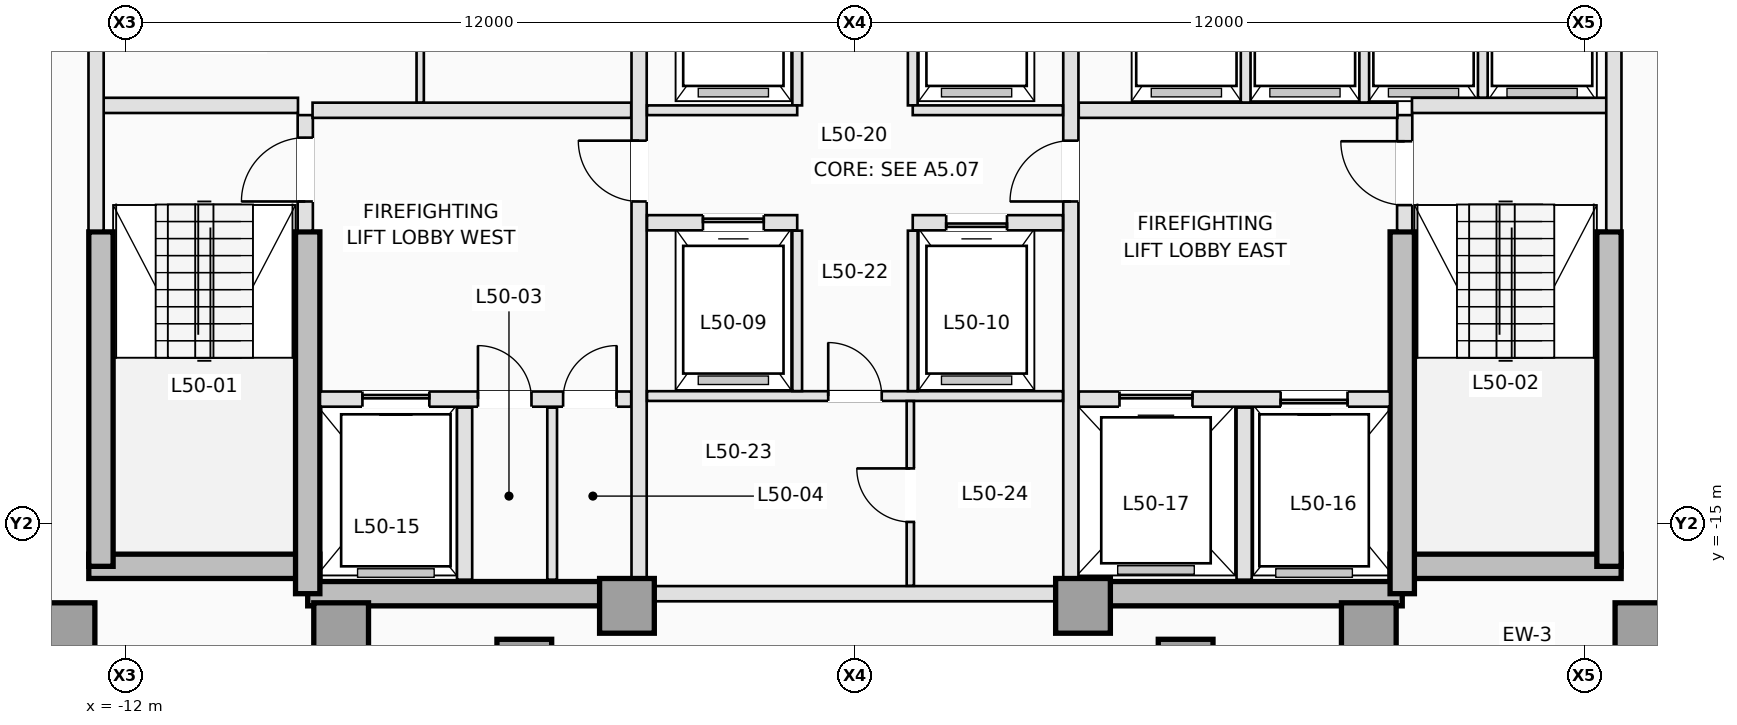
"""IFC4 building model, lengths in metres.
Left out: names, types, materials, properties, quantities, classifications, styles, units other than length and angle.
Written with IfcOpenShell. Run it as: python <this file> out.ifc"""

import sys

from ifc_helpers import new_model, si_unit, direction, frame, frame_2d, origin, origin_2d, place, context, subcontext, project, spatial, rectangle, extrude, element, fill, save


model = new_model("IFC4")
c1 = context("Model", 3, precision=1e-05, world=origin(), true_north=direction((0.0, 1.0)))
c2 = subcontext(c1, "Body", "Model", "MODEL_VIEW")
j1 = project(units=[si_unit("LENGTHUNIT", "METRE"), si_unit("PLANEANGLEUNIT", "RADIAN")], contexts=[c1])
p1 = place(None, origin())
s1 = spatial("IfcSite", under=j1, at=p1, CompositionType="ELEMENT")
p2 = place(p1, origin())
s2 = spatial("IfcBuilding", under=s1, at=p2, CompositionType="ELEMENT")
p3 = place(p2, frame((0.0, 0.0, 183.4)))
s3 = spatial("IfcBuildingStorey", under=s2, at=p3, CompositionType="ELEMENT", Elevation=183.4)
p4 = place(p3, frame((-12.6, -15.7, 0.0), z_axis=(0.0, 0.0, 1.0), x_axis=(1.0, 0.0, 0.0)))
e1 = element("IfcWall", 1, at=p4, inside=s3, PredefinedType="SHEAR", context=c2, shape_type="SweptSolid", body=[
    extrude(rectangle(XDim=3.8, YDim=0.4, at=frame_2d((1.9, 0.0))), origin(), (0.0, 0.0, 1.0), 3.5),
])
for number, where, z_axis, x_axis in (
    (2, (-9.0, -16.15, 0.0), (0.0, 0.0, 1.0), (1.0, 0.0, 0.0)),
    (3, (3.75, -16.15, 0.0), (0.0, 0.0, 1.0), (1.0, 0.0, 0.0)),
):
    element("IfcWall", number, at=place(p3, frame(where, z_axis=z_axis, x_axis=x_axis)), inside=s3, PredefinedType="SHEAR", context=c2, shape_type="SweptSolid", body=[
        extrude(rectangle(XDim=5.25, YDim=0.4, at=frame_2d((2.625, 0.0))), origin(), (0.0, 0.0, 1.0), 3.5),
    ])
p5 = place(p3, frame((8.8, -15.7, 0.0), z_axis=(0.0, 0.0, 1.0), x_axis=(1.0, 0.0, 0.0)))
e4 = element("IfcWall", 4, at=p5, inside=s3, PredefinedType="SHEAR", context=c2, shape_type="SweptSolid", body=[
    extrude(rectangle(XDim=3.8, YDim=0.4, at=frame_2d((1.9, 0.0))), origin(), (0.0, 0.0, 1.0), 3.5),
])
for number, where, z_axis, x_axis in (
    (5, (-12.4, -15.7, 0.0), (0.0, 0.0, 1.0), (0.0, 1.0, 0.0)),
    (6, (12.4, -15.7, 0.0), (0.0, 0.0, 1.0), (0.0, 1.0, 0.0)),
):
    element("IfcWall", number, at=place(p3, frame(where, z_axis=z_axis, x_axis=x_axis)), inside=s3, PredefinedType="SHEAR", context=c2, shape_type="SweptSolid", body=[
        extrude(rectangle(XDim=5.5, YDim=0.4, at=frame_2d((2.75, 0.0))), origin(), (0.0, 0.0, 1.0), 3.5),
    ])
for number, where, z_axis, x_axis in (
    (7, (-9.0, -16.15, 0.0), (0.0, 0.0, 1.0), (0.0, 1.0, 0.0)),
    (8, (9.0, -16.15, 0.0), (0.0, 0.0, 1.0), (0.0, 1.0, 0.0)),
):
    element("IfcWall", number, at=place(p3, frame(where, z_axis=z_axis, x_axis=x_axis)), inside=s3, PredefinedType="SHEAR", context=c2, shape_type="SweptSolid", body=[
        extrude(rectangle(XDim=5.95, YDim=0.4, at=frame_2d((2.975, 0.0))), origin(), (0.0, 0.0, 1.0), 3.5),
    ])
for number, where, z_axis, x_axis in (
    (9, (-12.95, -16.75, 0.0), (0.0, 0.0, 1.0), (1.0, 0.0, 0.0)),
    (10, (-8.45, -16.75, 0.0), (0.0, 0.0, 1.0), (1.0, 0.0, 0.0)),
    (11, (-3.75, -16.35, 0.0), (0.0, 0.0, 1.0), (1.0, 0.0, 0.0)),
    (12, (3.75, -16.35, 0.0), (0.0, 0.0, 1.0), (1.0, 0.0, 0.0)),
    (13, (8.45, -16.75, 0.0), (0.0, 0.0, 1.0), (1.0, 0.0, 0.0)),
    (14, (12.95, -16.75, 0.0), (0.0, 0.0, 1.0), (1.0, 0.0, 0.0)),
    (15, (-5.438, -17.35, 0.0), (0.0, 0.0, 1.0), (0.0, 1.0, 0.0)),
    (16, (5.438, -17.35, 0.0), (0.0, 0.0, 1.0), (0.0, 1.0, 0.0)),
):
    element("IfcColumn", number, at=place(p3, frame(where, z_axis=z_axis, x_axis=x_axis)), inside=s3, PredefinedType="COLUMN", context=c2, shape_type="SweptSolid", body=[
        extrude(rectangle(XDim=0.9, YDim=0.9, at=origin_2d()), origin(), (0.0, 0.0, 1.0), 3.5),
    ])
p6 = place(p3, frame((-9.04, -10.18, 0.0), z_axis=(0.0, 0.0, 1.0), x_axis=(0.0, 1.0, 0.0)))
e17 = element("IfcWall", 17, at=p6, inside=s3, PredefinedType="PARTITIONING", context=c2, shape_type="SweptSolid", body=[
    extrude(rectangle(XDim=1.9, YDim=0.25, at=frame_2d((0.95, 0.0))), origin(), (0.0, 0.0, 1.0), 3.25),
])
p7 = place(p6, frame((0.48, 0.0, 0.0)))
e18 = element("IfcOpeningElement", 18, at=p7, cuts=e17, PredefinedType="OPENING", context=c2, shape_type="SweptSolid", body=[
    extrude(rectangle(XDim=1.05, YDim=2.15, at=frame_2d((0.525, 1.075))), frame((0.0, 0.135, 0.0), z_axis=(0.0, -1.0, 0.0), x_axis=(1.0, 0.0, 0.0)), (0.0, 0.0, 1.0), 0.27),
])
p8 = place(p3, frame((9.04, -10.18, 0.0), z_axis=(0.0, 0.0, 1.0), x_axis=(0.0, 1.0, 0.0)))
e19 = element("IfcWall", 19, at=p8, inside=s3, PredefinedType="PARTITIONING", context=c2, shape_type="SweptSolid", body=[
    extrude(rectangle(XDim=1.9, YDim=0.25, at=frame_2d((0.95, 0.0))), origin(), (0.0, 0.0, 1.0), 3.25),
])
p9 = place(p8, frame((0.42, 0.0, 0.0)))
e20 = element("IfcOpeningElement", 20, at=p9, cuts=e19, PredefinedType="OPENING", context=c2, shape_type="SweptSolid", body=[
    extrude(rectangle(XDim=1.05, YDim=2.15, at=frame_2d((0.525, 1.075))), frame((0.0, 0.135, 0.0), z_axis=(0.0, -1.0, 0.0), x_axis=(1.0, 0.0, 0.0)), (0.0, 0.0, 1.0), 0.27),
])
for number, where, z_axis, x_axis in (
    (21, (-12.38, -8.12, 0.0), (0.0, 0.0, 1.0), (1.0, 0.0, 0.0)),
    (22, (9.16, -8.12, 0.0), (0.0, 0.0, 1.0), (1.0, 0.0, 0.0)),
):
    element("IfcWall", number, at=place(p3, frame(where, z_axis=z_axis, x_axis=x_axis)), inside=s3, PredefinedType="PARTITIONING", context=c2, shape_type="SweptSolid", body=[
        extrude(rectangle(XDim=3.22, YDim=0.25, at=frame_2d((1.61, 0.0))), origin(), (0.0, 0.0, 1.0), 3.25),
    ])
for number, where, z_axis, x_axis in (
    (23, (-12.48, -10.18, 0.0), (0.0, 0.0, 1.0), (0.0, 1.0, 0.0)),
    (24, (12.48, -10.18, 0.0), (0.0, 0.0, 1.0), (0.0, 1.0, 0.0)),
):
    element("IfcWall", number, at=place(p3, frame(where, z_axis=z_axis, x_axis=x_axis)), inside=s3, PredefinedType="PARTITIONING", context=c2, shape_type="SweptSolid", body=[
        extrude(rectangle(XDim=4.84, YDim=0.25, at=frame_2d((2.42, 0.0))), origin(), (0.0, 0.0, 1.0), 3.25),
    ])
p10 = place(p3, frame((-8.798, -12.95, 0.0), z_axis=(0.0, 0.0, 1.0), x_axis=(1.0, 0.0, 0.0)))
e25 = element("IfcWall", 25, at=p10, inside=s3, PredefinedType="PARTITIONING", context=c2, shape_type="SweptSolid", body=[
    extrude(rectangle(XDim=5.118, YDim=0.25, at=frame_2d((2.559, 0.0))), origin(), (0.0, 0.0, 1.0), 3.25),
])
p11 = place(p10, frame((0.698, 0.0, 0.0)))
e26 = element("IfcOpeningElement", 26, at=p11, cuts=e25, PredefinedType="OPENING", context=c2, shape_type="SweptSolid", body=[
    extrude(rectangle(XDim=1.1, YDim=2.15, at=frame_2d((0.55, 1.075))), frame((0.0, 0.135, 0.0), z_axis=(0.0, -1.0, 0.0), x_axis=(1.0, 0.0, 0.0)), (0.0, 0.0, 1.0), 0.27),
])
p12 = place(p10, frame((2.598, 0.0, 0.0)))
e27 = element("IfcOpeningElement", 27, at=p12, cuts=e25, PredefinedType="OPENING", context=c2, shape_type="SweptSolid", body=[
    extrude(rectangle(XDim=0.88, YDim=2.1, at=frame_2d((0.44, 1.05))), frame((0.0, 0.135, 0.0), z_axis=(0.0, -1.0, 0.0), x_axis=(1.0, 0.0, 0.0)), (0.0, 0.0, 1.0), 0.27),
])
p13 = place(p10, frame((3.998, 0.0, 0.0)))
e28 = element("IfcOpeningElement", 28, at=p13, cuts=e25, PredefinedType="OPENING", context=c2, shape_type="SweptSolid", body=[
    extrude(rectangle(XDim=0.88, YDim=2.1, at=frame_2d((0.44, 1.05))), frame((0.0, 0.135, 0.0), z_axis=(0.0, -1.0, 0.0), x_axis=(1.0, 0.0, 0.0)), (0.0, 0.0, 1.0), 0.27),
])
p14 = place(p3, frame((3.68, -12.95, 0.0), z_axis=(0.0, 0.0, 1.0), x_axis=(1.0, 0.0, 0.0)))
e29 = element("IfcWall", 29, at=p14, inside=s3, PredefinedType="PARTITIONING", context=c2, shape_type="SweptSolid", body=[
    extrude(rectangle(XDim=5.118, YDim=0.25, at=frame_2d((2.559, 0.0))), origin(), (0.0, 0.0, 1.0), 3.25),
])
p15 = place(p14, frame((3.32, 0.0, 0.0)))
e30 = element("IfcOpeningElement", 30, at=p15, cuts=e29, PredefinedType="OPENING", context=c2, shape_type="SweptSolid", body=[
    extrude(rectangle(XDim=1.1, YDim=2.15, at=frame_2d((0.55, 1.075))), frame((0.0, 0.135, 0.0), z_axis=(0.0, -1.0, 0.0), x_axis=(1.0, 0.0, 0.0)), (0.0, 0.0, 1.0), 0.27),
])
p16 = place(p14, frame((0.67, 0.0, 0.0)))
e31 = element("IfcOpeningElement", 31, at=p16, cuts=e29, PredefinedType="OPENING", context=c2, shape_type="SweptSolid", body=[
    extrude(rectangle(XDim=1.2, YDim=2.15, at=frame_2d((0.6, 1.075))), frame((0.0, 0.135, 0.0), z_axis=(0.0, -1.0, 0.0), x_axis=(1.0, 0.0, 0.0)), (0.0, 0.0, 1.0), 0.27),
])
p17 = place(p3, frame((-6.42, -15.92, 0.0), z_axis=(0.0, 0.0, 1.0), x_axis=(0.0, 1.0, 0.0)))
e32 = element("IfcWall", 32, at=p17, inside=s3, PredefinedType="PARTITIONING", context=c2, shape_type="SweptSolid", body=[
    extrude(rectangle(XDim=2.83, YDim=0.25, at=frame_2d((1.415, 0.0))), origin(), (0.0, 0.0, 1.0), 3.25),
])
p18 = place(p3, frame((-4.98, -15.92, 0.0), z_axis=(0.0, 0.0, 1.0), x_axis=(0.0, 1.0, 0.0)))
e33 = element("IfcWall", 33, at=p18, inside=s3, PredefinedType="PARTITIONING", context=c2, shape_type="SweptSolid", body=[
    extrude(rectangle(XDim=2.83, YDim=0.16, at=frame_2d((1.415, 0.0))), origin(), (0.0, 0.0, 1.0), 3.25),
])
p19 = place(p3, frame((6.4, -15.92, 0.0), z_axis=(0.0, 0.0, 1.0), x_axis=(0.0, 1.0, 0.0)))
e34 = element("IfcWall", 34, at=p19, inside=s3, PredefinedType="PARTITIONING", context=c2, shape_type="SweptSolid", body=[
    extrude(rectangle(XDim=2.83, YDim=0.25, at=frame_2d((1.415, 0.0))), origin(), (0.0, 0.0, 1.0), 3.25),
])
for number, where, z_axis, x_axis in (
    (35, (-8.92, -8.2, 0.0), (0.0, 0.0, 1.0), (1.0, 0.0, 0.0)),
    (36, (3.68, -8.2, 0.0), (0.0, 0.0, 1.0), (1.0, 0.0, 0.0)),
):
    element("IfcWall", number, at=place(p3, frame(where, z_axis=z_axis, x_axis=x_axis)), inside=s3, PredefinedType="PARTITIONING", context=c2, shape_type="SweptSolid", body=[
        extrude(rectangle(XDim=5.24, YDim=0.25, at=frame_2d((2.62, 0.0))), origin(), (0.0, 0.0, 1.0), 3.25),
    ])
p20 = place(p3, frame((-3.55, -15.898, 0.0), z_axis=(0.0, 0.0, 1.0), x_axis=(0.0, 1.0, 0.0)))
e37 = element("IfcWall", 37, at=p20, inside=s3, PredefinedType="PARTITIONING", context=c2, shape_type="SweptSolid", body=[
    extrude(rectangle(XDim=10.558, YDim=0.25, at=frame_2d((5.279, 0.0))), origin(), (0.0, 0.0, 1.0), 3.25),
])
p21 = place(p20, frame((6.198, 0.0, 0.0)))
e38 = element("IfcOpeningElement", 38, at=p21, cuts=e37, PredefinedType="OPENING", context=c2, shape_type="SweptSolid", body=[
    extrude(rectangle(XDim=1.0, YDim=2.15, at=frame_2d((0.5, 1.075))), frame((0.0, 0.135, 0.0), z_axis=(0.0, -1.0, 0.0), x_axis=(1.0, 0.0, 0.0)), (0.0, 0.0, 1.0), 0.27),
])
p22 = place(p3, frame((3.55, -15.898, 0.0), z_axis=(0.0, 0.0, 1.0), x_axis=(0.0, 1.0, 0.0)))
e39 = element("IfcWall", 39, at=p22, inside=s3, PredefinedType="PARTITIONING", context=c2, shape_type="SweptSolid", body=[
    extrude(rectangle(XDim=10.558, YDim=0.25, at=frame_2d((5.279, 0.0))), origin(), (0.0, 0.0, 1.0), 3.25),
])
p23 = place(p22, frame((6.198, 0.0, 0.0)))
e40 = element("IfcOpeningElement", 40, at=p23, cuts=e39, PredefinedType="OPENING", context=c2, shape_type="SweptSolid", body=[
    extrude(rectangle(XDim=1.0, YDim=2.15, at=frame_2d((0.5, 1.075))), frame((0.0, 0.135, 0.0), z_axis=(0.0, -1.0, 0.0), x_axis=(1.0, 0.0, 0.0)), (0.0, 0.0, 1.0), 0.27),
])
p24 = place(p3, frame((-7.15, -8.073, 0.0), z_axis=(0.0, 0.0, 1.0), x_axis=(0.0, 1.0, 0.0)))
e41 = element("IfcWall", 41, at=p24, inside=s3, PredefinedType="PARTITIONING", context=c2, shape_type="SweptSolid", body=[
    extrude(rectangle(XDim=2.733, YDim=0.12, at=frame_2d((1.366, 0.0))), origin(), (0.0, 0.0, 1.0), 3.25),
])
for number, where, z_axis, x_axis in (
    (42, (6.425, -8.073, 0.0), (0.0, 0.0, 1.0), (0.0, 1.0, 0.0)),
    (43, (8.375, -8.073, 0.0), (0.0, 0.0, 1.0), (0.0, 1.0, 0.0)),
):
    element("IfcWall", number, at=place(p3, frame(where, z_axis=z_axis, x_axis=x_axis)), inside=s3, PredefinedType="PARTITIONING", context=c2, shape_type="SweptSolid", body=[
        extrude(rectangle(XDim=2.733, YDim=0.16, at=frame_2d((1.366, 0.0))), origin(), (0.0, 0.0, 1.0), 3.25),
    ])
p25 = place(p3, frame((10.325, -7.993, 0.0), z_axis=(0.0, 0.0, 1.0), x_axis=(0.0, 1.0, 0.0)))
e44 = element("IfcWall", 44, at=p25, inside=s3, PredefinedType="PARTITIONING", context=c2, shape_type="SweptSolid", body=[
    extrude(rectangle(XDim=2.653, YDim=0.16, at=frame_2d((1.326, 0.0))), origin(), (0.0, 0.0, 1.0), 3.25),
])
p26 = place(p3, frame((-3.298, -16.15, 0.0), z_axis=(0.0, 0.0, 1.0), x_axis=(1.0, 0.0, 0.0)))
e45 = element("IfcWall", 45, at=p26, inside=s3, PredefinedType="PARTITIONING", context=c2, shape_type="SweptSolid", body=[
    extrude(rectangle(XDim=6.596, YDim=0.25, at=frame_2d((3.298, 0.0))), origin(), (0.0, 0.0, 1.0), 2.45),
])
for number, where, z_axis, x_axis in (
    (46, (-0.95, -8.12, 0.0), (0.0, 0.0, 1.0), (0.0, 1.0, 0.0)),
    (47, (0.95, -8.12, 0.0), (0.0, 0.0, 1.0), (0.0, 1.0, 0.0)),
):
    element("IfcWall", number, at=place(p3, frame(where, z_axis=z_axis, x_axis=x_axis)), inside=s3, PredefinedType="PARTITIONING", context=c2, shape_type="SweptSolid", body=[
        extrude(rectangle(XDim=2.78, YDim=0.16, at=frame_2d((1.39, 0.0))), origin(), (0.0, 0.0, 1.0), 3.25),
    ])
for number, where, z_axis, x_axis in (
    (48, (-3.42, -8.2, 0.0), (0.0, 0.0, 1.0), (1.0, 0.0, 0.0)),
    (49, (0.95, -8.2, 0.0), (0.0, 0.0, 1.0), (1.0, 0.0, 0.0)),
):
    element("IfcWall", number, at=place(p3, frame(where, z_axis=z_axis, x_axis=x_axis)), inside=s3, PredefinedType="PARTITIONING", context=c2, shape_type="SweptSolid", body=[
        extrude(rectangle(XDim=2.47, YDim=0.16, at=frame_2d((1.235, 0.0))), origin(), (0.0, 0.0, 1.0), 3.25),
    ])
p27 = place(p3, frame((-3.42, -10.05, 0.0), z_axis=(0.0, 0.0, 1.0), x_axis=(1.0, 0.0, 0.0)))
e50 = element("IfcWall", 50, at=p27, inside=s3, PredefinedType="PARTITIONING", context=c2, shape_type="SweptSolid", body=[
    extrude(rectangle(XDim=2.47, YDim=0.25, at=frame_2d((1.235, 0.0))), origin(), (0.0, 0.0, 1.0), 3.25),
])
p28 = place(p27, frame((0.92, 0.0, 0.0)))
e51 = element("IfcOpeningElement", 51, at=p28, cuts=e50, PredefinedType="OPENING", context=c2, shape_type="SweptSolid", body=[
    extrude(rectangle(XDim=1.0, YDim=2.15, at=frame_2d((0.5, 1.075))), frame((0.0, 0.135, 0.0), z_axis=(0.0, -1.0, 0.0), x_axis=(1.0, 0.0, 0.0)), (0.0, 0.0, 1.0), 0.27),
])
p29 = place(p3, frame((0.95, -10.05, 0.0), z_axis=(0.0, 0.0, 1.0), x_axis=(1.0, 0.0, 0.0)))
e52 = element("IfcWall", 52, at=p29, inside=s3, PredefinedType="PARTITIONING", context=c2, shape_type="SweptSolid", body=[
    extrude(rectangle(XDim=2.47, YDim=0.25, at=frame_2d((1.235, 0.0))), origin(), (0.0, 0.0, 1.0), 3.25),
])
p30 = place(p29, frame((0.55, 0.0, 0.0)))
e53 = element("IfcOpeningElement", 53, at=p30, cuts=e52, PredefinedType="OPENING", context=c2, shape_type="SweptSolid", body=[
    extrude(rectangle(XDim=1.0, YDim=2.15, at=frame_2d((0.5, 1.075))), frame((0.0, 0.135, 0.0), z_axis=(0.0, -1.0, 0.0), x_axis=(1.0, 0.0, 0.0)), (0.0, 0.0, 1.0), 0.27),
])
p31 = place(p3, frame((-3.42, -12.9, 0.0), z_axis=(0.0, 0.0, 1.0), x_axis=(1.0, 0.0, 0.0)))
e54 = element("IfcWall", 54, at=p31, inside=s3, PredefinedType="PARTITIONING", context=c2, shape_type="SweptSolid", body=[
    extrude(rectangle(XDim=6.84, YDim=0.16, at=frame_2d((3.42, 0.0))), origin(), (0.0, 0.0, 1.0), 3.25),
])
p32 = place(p31, frame((2.98, 0.0, 0.0)))
e55 = element("IfcOpeningElement", 55, at=p32, cuts=e54, PredefinedType="OPENING", context=c2, shape_type="SweptSolid", body=[
    extrude(rectangle(XDim=0.88, YDim=2.12, at=frame_2d((0.44, 1.06))), frame((0.0, 0.09, 0.0), z_axis=(0.0, -1.0, 0.0), x_axis=(1.0, 0.0, 0.0)), (0.0, 0.0, 1.0), 0.18),
])
for number, where, z_axis, x_axis in (
    (56, (-0.95, -12.818, 0.0), (0.0, 0.0, 1.0), (0.0, 1.0, 0.0)),
    (57, (0.95, -12.818, 0.0), (0.0, 0.0, 1.0), (0.0, 1.0, 0.0)),
):
    element("IfcWall", number, at=place(p3, frame(where, z_axis=z_axis, x_axis=x_axis)), inside=s3, PredefinedType="PARTITIONING", context=c2, shape_type="SweptSolid", body=[
        extrude(rectangle(XDim=2.638, YDim=0.16, at=frame_2d((1.319, 0.0))), origin(), (0.0, 0.0, 1.0), 3.25),
    ])
p33 = place(p3, frame((0.91, -16.02, 0.0), z_axis=(0.0, 0.0, 1.0), x_axis=(0.0, 1.0, 0.0)))
e58 = element("IfcWall", 58, at=p33, inside=s3, PredefinedType="PARTITIONING", context=c2, shape_type="SweptSolid", body=[
    extrude(rectangle(XDim=3.038, YDim=0.12, at=frame_2d((1.519, 0.0))), origin(), (0.0, 0.0, 1.0), 3.25),
])
p34 = place(p33, frame((1.05, 0.0, 0.0)))
e59 = element("IfcOpeningElement", 59, at=p34, cuts=e58, PredefinedType="OPENING", context=c2, shape_type="SweptSolid", body=[
    extrude(rectangle(XDim=0.88, YDim=2.12, at=frame_2d((0.44, 1.06))), frame((0.0, 0.07, 0.0), z_axis=(0.0, -1.0, 0.0), x_axis=(1.0, 0.0, 0.0)), (0.0, 0.0, 1.0), 0.14),
])
p35 = place(p11, origin())
e60 = element("IfcDoor", 60, at=p35, inside=s3, OperationType="SLIDING_TO_LEFT", PredefinedType="DOOR", context=c2, shape_type="SweptSolid", body=[
    extrude(rectangle(XDim=1.1, YDim=2.15, at=frame_2d((0.55, 1.075))), frame((0.0, 0.025, 0.0), z_axis=(0.0, -1.0, 0.0), x_axis=(1.0, 0.0, 0.0)), (0.0, 0.0, 1.0), 0.05),
])
fill(e26, e60)
p36 = place(p15, origin())
e61 = element("IfcDoor", 61, at=p36, inside=s3, OperationType="SLIDING_TO_RIGHT", PredefinedType="DOOR", context=c2, shape_type="SweptSolid", body=[
    extrude(rectangle(XDim=1.1, YDim=2.15, at=frame_2d((0.55, 1.075))), frame((0.0, 0.025, 0.0), z_axis=(0.0, -1.0, 0.0), x_axis=(1.0, 0.0, 0.0)), (0.0, 0.0, 1.0), 0.05),
])
fill(e30, e61)
p37 = place(p16, origin())
e62 = element("IfcDoor", 62, at=p37, inside=s3, OperationType="SLIDING_TO_LEFT", PredefinedType="DOOR", context=c2, shape_type="SweptSolid", body=[
    extrude(rectangle(XDim=1.2, YDim=2.15, at=frame_2d((0.6, 1.075))), frame((0.0, 0.025, 0.0), z_axis=(0.0, -1.0, 0.0), x_axis=(1.0, 0.0, 0.0)), (0.0, 0.0, 1.0), 0.05),
])
fill(e31, e62)
p38 = place(p28, origin())
e63 = element("IfcDoor", 63, at=p38, inside=s3, OperationType="SLIDING_TO_LEFT", PredefinedType="DOOR", context=c2, shape_type="SweptSolid", body=[
    extrude(rectangle(XDim=1.0, YDim=2.15, at=frame_2d((0.5, 1.075))), frame((0.0, 0.025, 0.0), z_axis=(0.0, -1.0, 0.0), x_axis=(1.0, 0.0, 0.0)), (0.0, 0.0, 1.0), 0.05),
])
fill(e51, e63)
p39 = place(p30, origin())
e64 = element("IfcDoor", 64, at=p39, inside=s3, OperationType="SLIDING_TO_RIGHT", PredefinedType="DOOR", context=c2, shape_type="SweptSolid", body=[
    extrude(rectangle(XDim=1.0, YDim=2.15, at=frame_2d((0.5, 1.075))), frame((0.0, 0.025, 0.0), z_axis=(0.0, -1.0, 0.0), x_axis=(1.0, 0.0, 0.0)), (0.0, 0.0, 1.0), 0.05),
])
fill(e53, e64)
p40 = place(p7, origin())
e65 = element("IfcDoor", 65, at=p40, inside=s3, OperationType="SINGLE_SWING_LEFT", PredefinedType="DOOR", context=c2, shape_type="SweptSolid", body=[
    extrude(rectangle(XDim=1.05, YDim=2.15, at=frame_2d((0.525, 1.075))), frame((0.0, 0.025, 0.0), z_axis=(0.0, -1.0, 0.0), x_axis=(1.0, 0.0, 0.0)), (0.0, 0.0, 1.0), 0.05),
])
fill(e18, e65)
p41 = place(p9, origin())
e66 = element("IfcDoor", 66, at=p41, inside=s3, OperationType="SINGLE_SWING_RIGHT", PredefinedType="DOOR", context=c2, shape_type="SweptSolid", body=[
    extrude(rectangle(XDim=1.05, YDim=2.15, at=frame_2d((0.525, 1.075))), frame((0.0, 0.025, 0.0), z_axis=(0.0, -1.0, 0.0), x_axis=(1.0, 0.0, 0.0)), (0.0, 0.0, 1.0), 0.05),
])
fill(e20, e66)
p42 = place(p12, origin())
e67 = element("IfcDoor", 67, at=p42, inside=s3, OperationType="SINGLE_SWING_LEFT", PredefinedType="TRAPDOOR", context=c2, shape_type="SweptSolid", body=[
    extrude(rectangle(XDim=0.88, YDim=2.1, at=frame_2d((0.44, 1.05))), frame((0.0, 0.025, 0.0), z_axis=(0.0, -1.0, 0.0), x_axis=(1.0, 0.0, 0.0)), (0.0, 0.0, 1.0), 0.05),
])
fill(e27, e67)
p43 = place(p13, origin())
e68 = element("IfcDoor", 68, at=p43, inside=s3, OperationType="SINGLE_SWING_RIGHT", PredefinedType="TRAPDOOR", context=c2, shape_type="SweptSolid", body=[
    extrude(rectangle(XDim=0.88, YDim=2.1, at=frame_2d((0.44, 1.05))), frame((0.0, 0.025, 0.0), z_axis=(0.0, -1.0, 0.0), x_axis=(1.0, 0.0, 0.0)), (0.0, 0.0, 1.0), 0.05),
])
fill(e28, e68)
p44 = place(p21, origin())
e69 = element("IfcDoor", 69, at=p44, inside=s3, OperationType="SINGLE_SWING_RIGHT", PredefinedType="DOOR", context=c2, shape_type="SweptSolid", body=[
    extrude(rectangle(XDim=1.0, YDim=2.15, at=frame_2d((0.5, 1.075))), frame((0.0, 0.025, 0.0), z_axis=(0.0, -1.0, 0.0), x_axis=(1.0, 0.0, 0.0)), (0.0, 0.0, 1.0), 0.05),
])
fill(e38, e69)
p45 = place(p23, origin())
e70 = element("IfcDoor", 70, at=p45, inside=s3, OperationType="SINGLE_SWING_LEFT", PredefinedType="DOOR", context=c2, shape_type="SweptSolid", body=[
    extrude(rectangle(XDim=1.0, YDim=2.15, at=frame_2d((0.5, 1.075))), frame((0.0, 0.025, 0.0), z_axis=(0.0, -1.0, 0.0), x_axis=(1.0, 0.0, 0.0)), (0.0, 0.0, 1.0), 0.05),
])
fill(e40, e70)
p46 = place(p32, origin())
e71 = element("IfcDoor", 71, at=p46, inside=s3, OperationType="SINGLE_SWING_LEFT", PredefinedType="DOOR", context=c2, shape_type="SweptSolid", body=[
    extrude(rectangle(XDim=0.88, YDim=2.12, at=frame_2d((0.44, 1.06))), frame((0.0, 0.025, 0.0), z_axis=(0.0, -1.0, 0.0), x_axis=(1.0, 0.0, 0.0)), (0.0, 0.0, 1.0), 0.05),
])
fill(e55, e71)
p47 = place(p34, origin())
e72 = element("IfcDoor", 72, at=p47, inside=s3, OperationType="SINGLE_SWING_RIGHT", PredefinedType="DOOR", context=c2, shape_type="SweptSolid", body=[
    extrude(rectangle(XDim=0.88, YDim=2.12, at=frame_2d((0.44, 1.06))), frame((0.0, 0.025, 0.0), z_axis=(0.0, -1.0, 0.0), x_axis=(1.0, 0.0, 0.0)), (0.0, 0.0, 1.0), 0.05),
])
fill(e59, e72)
save(model, sys.argv[1])
